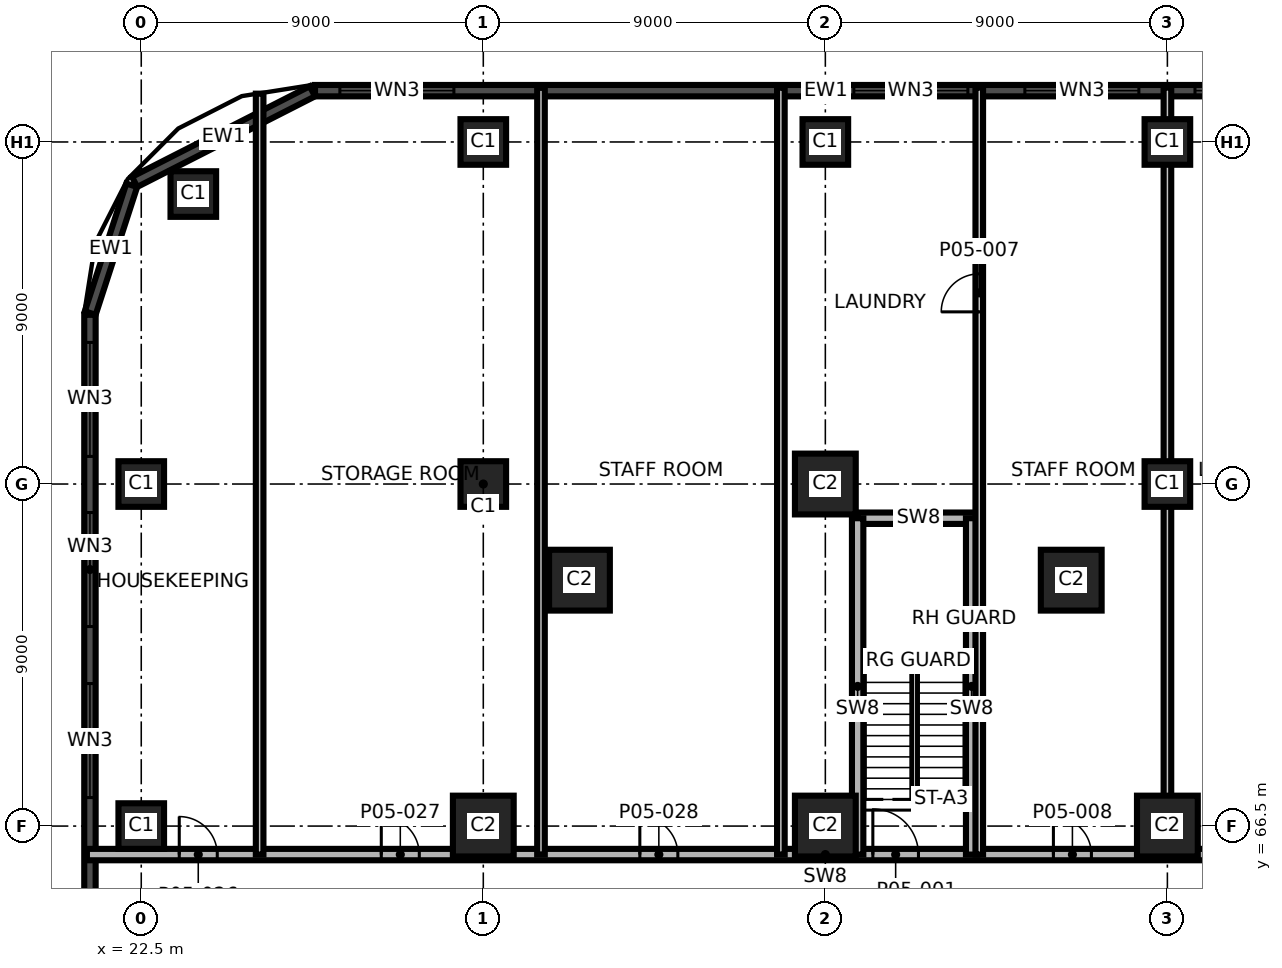
"""IFC4 building model, lengths in metres.
Left out: names, types, materials, properties, quantities, classifications, styles, units other than length and angle.
Written with IfcOpenShell. Run it as: python <this file> out.ifc"""

import sys

from ifc_helpers import new_model, si_unit, direction, frame, frame_2d, origin, origin_2d, place, context, subcontext, project, spatial, rectangle, extrude, element, fill, save


model = new_model("IFC4")
c1 = context("Model", 3, precision=1e-05, world=origin(), true_north=direction((0.0, 1.0)))
c2 = subcontext(c1, "Body", "Model", "MODEL_VIEW")
j1 = project(units=[si_unit("LENGTHUNIT", "METRE"), si_unit("PLANEANGLEUNIT", "RADIAN")], contexts=[c1])
p1 = place(None, origin())
s1 = spatial("IfcSite", under=j1, at=p1, CompositionType="ELEMENT")
p2 = place(p1, origin())
s2 = spatial("IfcBuilding", under=s1, at=p2, CompositionType="ELEMENT")
p3 = place(p2, frame((0.0, 0.0, 28.5)))
s3 = spatial("IfcBuildingStorey", under=s2, at=p3, CompositionType="ELEMENT", Elevation=28.5)
p4 = place(p3, frame((22.5, 66.5, 0.0), z_axis=(0.0, 0.0, 1.0), x_axis=(1.0, 0.0, 0.0)))
e1 = element("IfcColumn", 1, at=p4, inside=s3, PredefinedType="COLUMN", context=c2, shape_type="SweptSolid", body=[
    extrude(rectangle(XDim=1.2, YDim=1.2, at=origin_2d()), origin(), (0.0, 0.0, 1.0), 5.0),
])
for number, where, z_axis, x_axis in (
    (2, (31.5, 66.5, 0.0), (0.0, 0.0, 1.0), (1.0, 0.0, 0.0)),
    (3, (40.5, 66.5, 0.0), (0.0, 0.0, 1.0), (1.0, 0.0, 0.0)),
    (4, (49.5, 66.5, 0.0), (0.0, 0.0, 1.0), (1.0, 0.0, 0.0)),
):
    element("IfcColumn", number, at=place(p3, frame(where, z_axis=z_axis, x_axis=x_axis)), inside=s3, PredefinedType="COLUMN", context=c2, shape_type="SweptSolid", body=[
        extrude(rectangle(XDim=1.6, YDim=1.6, at=origin_2d()), origin(), (0.0, 0.0, 1.0), 5.0),
    ])
for number, where, z_axis, x_axis in (
    (5, (22.5, 75.5, 0.0), (0.0, 0.0, 1.0), (1.0, 0.0, 0.0)),
    (6, (31.5, 75.5, 0.0), (0.0, 0.0, 1.0), (1.0, 0.0, 0.0)),
):
    element("IfcColumn", number, at=place(p3, frame(where, z_axis=z_axis, x_axis=x_axis)), inside=s3, PredefinedType="COLUMN", context=c2, shape_type="SweptSolid", body=[
        extrude(rectangle(XDim=1.2, YDim=1.2, at=origin_2d()), origin(), (0.0, 0.0, 1.0), 5.0),
    ])
p5 = place(p3, frame((40.5, 75.5, 0.0), z_axis=(0.0, 0.0, 1.0), x_axis=(1.0, 0.0, 0.0)))
e7 = element("IfcColumn", 7, at=p5, inside=s3, PredefinedType="COLUMN", context=c2, shape_type="SweptSolid", body=[
    extrude(rectangle(XDim=1.6, YDim=1.6, at=origin_2d()), origin(), (0.0, 0.0, 1.0), 5.0),
])
for number, where, z_axis, x_axis in (
    (8, (49.5, 75.5, 0.0), (0.0, 0.0, 1.0), (1.0, 0.0, 0.0)),
    (9, (23.87, 83.13, 0.0), (0.0, 0.0, 1.0), (1.0, 0.0, 0.0)),
    (10, (31.5, 84.5, 0.0), (0.0, 0.0, 1.0), (1.0, 0.0, 0.0)),
    (11, (40.5, 84.5, 0.0), (0.0, 0.0, 1.0), (1.0, 0.0, 0.0)),
    (12, (49.5, 84.5, 0.0), (0.0, 0.0, 1.0), (1.0, 0.0, 0.0)),
):
    element("IfcColumn", number, at=place(p3, frame(where, z_axis=z_axis, x_axis=x_axis)), inside=s3, PredefinedType="COLUMN", context=c2, shape_type="SweptSolid", body=[
        extrude(rectangle(XDim=1.2, YDim=1.2, at=origin_2d()), origin(), (0.0, 0.0, 1.0), 5.0),
    ])
for number, where, z_axis, x_axis in (
    (13, (34.03, 72.97, 0.0), (0.0, 0.0, 1.0), (1.0, 0.0, 0.0)),
    (14, (46.97, 72.97, 0.0), (0.0, 0.0, 1.0), (1.0, 0.0, 0.0)),
):
    element("IfcColumn", number, at=place(p3, frame(where, z_axis=z_axis, x_axis=x_axis)), inside=s3, PredefinedType="COLUMN", context=c2, shape_type="SweptSolid", body=[
        extrude(rectangle(XDim=1.6, YDim=1.6, at=origin_2d()), origin(), (0.0, 0.0, 1.0), 5.0),
    ])
p6 = place(p3, frame((53.952, 85.85, 0.0), z_axis=(0.0, 0.0, 1.0), x_axis=(-1.0, 0.0, 0.0)))
e15 = element("IfcWall", 15, at=p6, inside=s3, PredefinedType="SOLIDWALL", context=c2, shape_type="SweptSolid", body=[
    extrude(rectangle(XDim=26.88, YDim=0.3, at=frame_2d((13.44, 0.0))), origin(), (0.0, 0.0, 1.0), 4.7),
])
p7 = place(p6, frame((0.726, 0.0, 0.9)))
e16 = element("IfcOpeningElement", 16, at=p7, cuts=e15, PredefinedType="OPENING", context=c2, shape_type="SweptSolid", body=[
    extrude(rectangle(XDim=3.0, YDim=2.4, at=frame_2d((1.5, 1.2))), frame((0.0, 0.16, 0.0), z_axis=(0.0, -1.0, 0.0), x_axis=(1.0, 0.0, 0.0)), (0.0, 0.0, 1.0), 0.32),
])
p8 = place(p6, frame((5.202, 0.0, 0.9)))
e17 = element("IfcOpeningElement", 17, at=p8, cuts=e15, PredefinedType="OPENING", context=c2, shape_type="SweptSolid", body=[
    extrude(rectangle(XDim=3.0, YDim=2.4, at=frame_2d((1.5, 1.2))), frame((0.0, 0.16, 0.0), z_axis=(0.0, -1.0, 0.0), x_axis=(1.0, 0.0, 0.0)), (0.0, 0.0, 1.0), 0.32),
])
p9 = place(p6, frame((9.702, 0.0, 0.9)))
e18 = element("IfcOpeningElement", 18, at=p9, cuts=e15, PredefinedType="OPENING", context=c2, shape_type="SweptSolid", body=[
    extrude(rectangle(XDim=3.0, YDim=2.4, at=frame_2d((1.5, 1.2))), frame((0.0, 0.16, 0.0), z_axis=(0.0, -1.0, 0.0), x_axis=(1.0, 0.0, 0.0)), (0.0, 0.0, 1.0), 0.32),
])
p10 = place(p6, frame((23.226, 0.0, 0.9)))
e19 = element("IfcOpeningElement", 19, at=p10, cuts=e15, PredefinedType="OPENING", context=c2, shape_type="SweptSolid", body=[
    extrude(rectangle(XDim=3.0, YDim=2.4, at=frame_2d((1.5, 1.2))), frame((0.0, 0.16, 0.0), z_axis=(0.0, -1.0, 0.0), x_axis=(1.0, 0.0, 0.0)), (0.0, 0.0, 1.0), 0.32),
])
p11 = place(p3, frame((27.004, 85.834, 0.0), z_axis=(0.0, 0.0, 1.0), x_axis=(-0.890998339455, -0.454006562826, 0.0)))
e20 = element("IfcWall", 20, at=p11, inside=s3, PredefinedType="SOLIDWALL", context=c2, shape_type="SweptSolid", body=[
    extrude(rectangle(XDim=5.252, YDim=0.3, at=frame_2d((2.626, 0.0))), origin(), (0.0, 0.0, 1.0), 4.7),
])
p12 = place(p3, frame((22.25, 83.362, 0.0), z_axis=(0.0, 0.0, 1.0), x_axis=(-0.309073584194, -0.951038127287, 0.0)))
e21 = element("IfcWall", 21, at=p12, inside=s3, PredefinedType="SOLIDWALL", context=c2, shape_type="SweptSolid", body=[
    extrude(rectangle(XDim=3.536, YDim=0.3, at=frame_2d((1.768, 0.0))), origin(), (0.0, 0.0, 1.0), 4.7),
])
p13 = place(p3, frame((21.15, 79.952, 0.0), z_axis=(0.0, 0.0, 1.0), x_axis=(0.0, -1.0, 0.0)))
e22 = element("IfcWall", 22, at=p13, inside=s3, PredefinedType="SOLIDWALL", context=c2, shape_type="SweptSolid", body=[
    extrude(rectangle(XDim=62.88, YDim=0.3, at=frame_2d((31.44, 0.0))), origin(), (0.0, 0.0, 1.0), 4.7),
])
p14 = place(p13, frame((0.726, 0.0, 0.9)))
e23 = element("IfcOpeningElement", 23, at=p14, cuts=e22, PredefinedType="OPENING", context=c2, shape_type="SweptSolid", body=[
    extrude(rectangle(XDim=3.0, YDim=2.4, at=frame_2d((1.5, 1.2))), frame((0.0, 0.16, 0.0), z_axis=(0.0, -1.0, 0.0), x_axis=(1.0, 0.0, 0.0)), (0.0, 0.0, 1.0), 0.32),
])
p15 = place(p13, frame((5.202, 0.0, 0.9)))
e24 = element("IfcOpeningElement", 24, at=p15, cuts=e22, PredefinedType="OPENING", context=c2, shape_type="SweptSolid", body=[
    extrude(rectangle(XDim=3.0, YDim=2.4, at=frame_2d((1.5, 1.2))), frame((0.0, 0.16, 0.0), z_axis=(0.0, -1.0, 0.0), x_axis=(1.0, 0.0, 0.0)), (0.0, 0.0, 1.0), 0.32),
])
p16 = place(p13, frame((9.702, 0.0, 0.9)))
e25 = element("IfcOpeningElement", 25, at=p16, cuts=e22, PredefinedType="OPENING", context=c2, shape_type="SweptSolid", body=[
    extrude(rectangle(XDim=3.0, YDim=2.4, at=frame_2d((1.5, 1.2))), frame((0.0, 0.16, 0.0), z_axis=(0.0, -1.0, 0.0), x_axis=(1.0, 0.0, 0.0)), (0.0, 0.0, 1.0), 0.32),
])
p17 = place(p13, frame((18.702, 0.0, 0.9)))
e26 = element("IfcOpeningElement", 26, at=p17, cuts=e22, PredefinedType="OPENING", context=c2, shape_type="SweptSolid", body=[
    extrude(rectangle(XDim=3.0, YDim=2.4, at=frame_2d((1.5, 1.2))), frame((0.0, 0.16, 0.0), z_axis=(0.0, -1.0, 0.0), x_axis=(1.0, 0.0, 0.0)), (0.0, 0.0, 1.0), 0.32),
])
p18 = place(p13, frame((23.202, 0.0, 0.9)))
e27 = element("IfcOpeningElement", 27, at=p18, cuts=e22, PredefinedType="OPENING", context=c2, shape_type="SweptSolid", body=[
    extrude(rectangle(XDim=3.0, YDim=2.4, at=frame_2d((1.5, 1.2))), frame((0.0, 0.16, 0.0), z_axis=(0.0, -1.0, 0.0), x_axis=(1.0, 0.0, 0.0)), (0.0, 0.0, 1.0), 0.32),
])
p19 = place(p13, frame((27.702, 0.0, 0.9)))
e28 = element("IfcOpeningElement", 28, at=p19, cuts=e22, PredefinedType="OPENING", context=c2, shape_type="SweptSolid", body=[
    extrude(rectangle(XDim=3.0, YDim=2.4, at=frame_2d((1.5, 1.2))), frame((0.0, 0.16, 0.0), z_axis=(0.0, -1.0, 0.0), x_axis=(1.0, 0.0, 0.0)), (0.0, 0.0, 1.0), 0.32),
])
p20 = place(p13, frame((32.202, 0.0, 0.9)))
e29 = element("IfcOpeningElement", 29, at=p20, cuts=e22, PredefinedType="OPENING", context=c2, shape_type="SweptSolid", body=[
    extrude(rectangle(XDim=3.0, YDim=2.4, at=frame_2d((1.5, 1.2))), frame((0.0, 0.16, 0.0), z_axis=(0.0, -1.0, 0.0), x_axis=(1.0, 0.0, 0.0)), (0.0, 0.0, 1.0), 0.32),
])
p21 = place(p13, frame((41.202, 0.0, 0.9)))
e30 = element("IfcOpeningElement", 30, at=p21, cuts=e22, PredefinedType="OPENING", context=c2, shape_type="SweptSolid", body=[
    extrude(rectangle(XDim=3.0, YDim=2.4, at=frame_2d((1.5, 1.2))), frame((0.0, 0.16, 0.0), z_axis=(0.0, -1.0, 0.0), x_axis=(1.0, 0.0, 0.0)), (0.0, 0.0, 1.0), 0.32),
])
p22 = place(p13, frame((45.702, 0.0, 0.9)))
e31 = element("IfcOpeningElement", 31, at=p22, cuts=e22, PredefinedType="OPENING", context=c2, shape_type="SweptSolid", body=[
    extrude(rectangle(XDim=3.0, YDim=2.4, at=frame_2d((1.5, 1.2))), frame((0.0, 0.16, 0.0), z_axis=(0.0, -1.0, 0.0), x_axis=(1.0, 0.0, 0.0)), (0.0, 0.0, 1.0), 0.32),
])
p23 = place(p13, frame((50.202, 0.0, 0.9)))
e32 = element("IfcOpeningElement", 32, at=p23, cuts=e22, PredefinedType="OPENING", context=c2, shape_type="SweptSolid", body=[
    extrude(rectangle(XDim=3.0, YDim=2.4, at=frame_2d((1.5, 1.2))), frame((0.0, 0.16, 0.0), z_axis=(0.0, -1.0, 0.0), x_axis=(1.0, 0.0, 0.0)), (0.0, 0.0, 1.0), 0.32),
])
p24 = place(p13, frame((54.702, 0.0, 0.9)))
e33 = element("IfcOpeningElement", 33, at=p24, cuts=e22, PredefinedType="OPENING", context=c2, shape_type="SweptSolid", body=[
    extrude(rectangle(XDim=3.0, YDim=2.4, at=frame_2d((1.5, 1.2))), frame((0.0, 0.16, 0.0), z_axis=(0.0, -1.0, 0.0), x_axis=(1.0, 0.0, 0.0)), (0.0, 0.0, 1.0), 0.32),
])
p25 = place(p13, frame((59.226, 0.0, 0.9)))
e34 = element("IfcOpeningElement", 34, at=p25, cuts=e22, PredefinedType="OPENING", context=c2, shape_type="SweptSolid", body=[
    extrude(rectangle(XDim=3.0, YDim=2.4, at=frame_2d((1.5, 1.2))), frame((0.0, 0.16, 0.0), z_axis=(0.0, -1.0, 0.0), x_axis=(1.0, 0.0, 0.0)), (0.0, 0.0, 1.0), 0.32),
])
p26 = place(p3, frame((21.07, 65.75, 0.0), z_axis=(0.0, 0.0, 1.0), x_axis=(1.0, 0.0, 0.0)))
e35 = element("IfcWall", 35, at=p26, inside=s3, PredefinedType="SHEAR", context=c2, shape_type="SweptSolid", body=[
    extrude(rectangle(XDim=38.86, YDim=0.3, at=frame_2d((19.43, 0.0))), origin(), (0.0, 0.0, 1.0), 4.7),
])
p27 = place(p26, frame((20.68, 0.0, 0.0)))
e36 = element("IfcOpeningElement", 36, at=p27, cuts=e35, PredefinedType="OPENING", context=c2, shape_type="SweptSolid", body=[
    extrude(rectangle(XDim=1.2, YDim=2.1, at=frame_2d((0.6, 1.05))), frame((0.0, 0.16, 0.0), z_axis=(0.0, -1.0, 0.0), x_axis=(1.0, 0.0, 0.0)), (0.0, 0.0, 1.0), 0.32),
])
p28 = place(p26, frame((25.431, 0.0, 0.0)))
e37 = element("IfcOpeningElement", 37, at=p28, cuts=e35, PredefinedType="OPENING", context=c2, shape_type="SweptSolid", body=[
    extrude(rectangle(XDim=1.0, YDim=2.1, at=frame_2d((0.5, 1.05))), frame((0.0, 0.16, 0.0), z_axis=(0.0, -1.0, 0.0), x_axis=(1.0, 0.0, 0.0)), (0.0, 0.0, 1.0), 0.32),
])
p29 = place(p26, frame((2.43, 0.0, 0.0)))
e38 = element("IfcOpeningElement", 38, at=p29, cuts=e35, PredefinedType="OPENING", context=c2, shape_type="SweptSolid", body=[
    extrude(rectangle(XDim=1.0, YDim=2.1, at=frame_2d((0.5, 1.05))), frame((0.0, 0.16, 0.0), z_axis=(0.0, -1.0, 0.0), x_axis=(1.0, 0.0, 0.0)), (0.0, 0.0, 1.0), 0.32),
])
p30 = place(p26, frame((7.746, 0.0, 0.0)))
e39 = element("IfcOpeningElement", 39, at=p30, cuts=e35, PredefinedType="OPENING", context=c2, shape_type="SweptSolid", body=[
    extrude(rectangle(XDim=1.0, YDim=2.1, at=frame_2d((0.5, 1.05))), frame((0.0, 0.16, 0.0), z_axis=(0.0, -1.0, 0.0), x_axis=(1.0, 0.0, 0.0)), (0.0, 0.0, 1.0), 0.32),
])
p31 = place(p26, frame((14.549, 0.0, 0.0)))
e40 = element("IfcOpeningElement", 40, at=p31, cuts=e35, PredefinedType="OPENING", context=c2, shape_type="SweptSolid", body=[
    extrude(rectangle(XDim=1.0, YDim=2.1, at=frame_2d((0.5, 1.05))), frame((0.0, 0.16, 0.0), z_axis=(0.0, -1.0, 0.0), x_axis=(1.0, 0.0, 0.0)), (0.0, 0.0, 1.0), 0.32),
])
p32 = place(p26, frame((29.965, 0.0, 0.0)))
e41 = element("IfcOpeningElement", 41, at=p32, cuts=e35, PredefinedType="OPENING", context=c2, shape_type="SweptSolid", body=[
    extrude(rectangle(XDim=1.0, YDim=2.1, at=frame_2d((0.5, 1.05))), frame((0.0, 0.16, 0.0), z_axis=(0.0, -1.0, 0.0), x_axis=(1.0, 0.0, 0.0)), (0.0, 0.0, 1.0), 0.32),
])
p33 = place(p26, frame((35.175, 0.0, 0.0)))
e42 = element("IfcOpeningElement", 42, at=p33, cuts=e35, PredefinedType="OPENING", context=c2, shape_type="SweptSolid", body=[
    extrude(rectangle(XDim=1.0, YDim=2.1, at=frame_2d((0.5, 1.05))), frame((0.0, 0.16, 0.0), z_axis=(0.0, -1.0, 0.0), x_axis=(1.0, 0.0, 0.0)), (0.0, 0.0, 1.0), 0.32),
])
p34 = place(p3, frame((41.35, 74.6, 0.0), z_axis=(0.0, 0.0, 1.0), x_axis=(1.0, 0.0, 0.0)))
e43 = element("IfcWall", 43, at=p34, inside=s3, PredefinedType="SHEAR", context=c2, shape_type="SweptSolid", body=[
    extrude(rectangle(XDim=3.2, YDim=0.3, at=frame_2d((1.6, 0.0))), origin(), (0.0, 0.0, 1.0), 4.7),
])
p35 = place(p3, frame((25.615, 65.75, 0.0), z_axis=(0.0, 0.0, 1.0), x_axis=(0.0, 1.0, 0.0)))
e44 = element("IfcWall", 44, at=p35, inside=s3, PredefinedType="PARTITIONING", context=c2, shape_type="SweptSolid", body=[
    extrude(rectangle(XDim=20.021, YDim=0.2, at=frame_2d((10.01, 0.0))), origin(), (0.0, 0.0, 1.0), 4.7),
])
for number, where, z_axis, x_axis in (
    (45, (33.018, 65.75, 0.0), (0.0, 0.0, 1.0), (0.0, 1.0, 0.0)),
    (46, (39.33, 65.75, 0.0), (0.0, 0.0, 1.0), (0.0, 1.0, 0.0)),
):
    element("IfcWall", number, at=place(p3, frame(where, z_axis=z_axis, x_axis=x_axis)), inside=s3, PredefinedType="PARTITIONING", context=c2, shape_type="SweptSolid", body=[
        extrude(rectangle(XDim=20.18, YDim=0.2, at=frame_2d((10.09, 0.0))), origin(), (0.0, 0.0, 1.0), 4.7),
    ])
for number, where, z_axis, x_axis in (
    (47, (41.35, 65.75, 0.0), (0.0, 0.0, 1.0), (0.0, 1.0, 0.0)),
    (48, (44.35, 65.75, 0.0), (0.0, 0.0, 1.0), (0.0, 1.0, 0.0)),
):
    element("IfcWall", number, at=place(p3, frame(where, z_axis=z_axis, x_axis=x_axis)), inside=s3, PredefinedType="SHEAR", context=c2, shape_type="SweptSolid", body=[
        extrude(rectangle(XDim=8.85, YDim=0.3, at=frame_2d((4.425, 0.0))), origin(), (0.0, 0.0, 1.0), 4.7),
    ])
p36 = place(p3, frame((44.55, 65.75, 0.0), z_axis=(0.0, 0.0, 1.0), x_axis=(0.0, 1.0, 0.0)))
e49 = element("IfcWall", 49, at=p36, inside=s3, PredefinedType="PARTITIONING", context=c2, shape_type="SweptSolid", body=[
    extrude(rectangle(XDim=20.18, YDim=0.2, at=frame_2d((10.09, 0.0))), origin(), (0.0, 0.0, 1.0), 4.7),
])
p37 = place(p36, frame((14.28, 0.0, 0.0)))
e50 = element("IfcOpeningElement", 50, at=p37, cuts=e49, PredefinedType="OPENING", context=c2, shape_type="SweptSolid", body=[
    extrude(rectangle(XDim=1.0, YDim=2.1, at=frame_2d((0.5, 1.05))), frame((0.0, 0.11, 0.0), z_axis=(0.0, -1.0, 0.0), x_axis=(1.0, 0.0, 0.0)), (0.0, 0.0, 1.0), 0.22),
])
p38 = place(p3, frame((49.501, 65.75, 0.0), z_axis=(0.0, 0.0, 1.0), x_axis=(0.0, 1.0, 0.0)))
e51 = element("IfcWall", 51, at=p38, inside=s3, PredefinedType="PARTITIONING", context=c2, shape_type="SweptSolid", body=[
    extrude(rectangle(XDim=20.18, YDim=0.2, at=frame_2d((10.09, 0.0))), origin(), (0.0, 0.0, 1.0), 4.7),
])
p39 = place(p7, origin())
e52 = element("IfcWindow", 52, at=p39, inside=s3, PartitioningType="SINGLE_PANEL", PredefinedType="WINDOW", context=c2, shape_type="SweptSolid", body=[
    extrude(rectangle(XDim=3.0, YDim=2.4, at=frame_2d((1.5, 1.2))), frame((0.0, 0.03, 0.0), z_axis=(0.0, -1.0, 0.0), x_axis=(1.0, 0.0, 0.0)), (0.0, 0.0, 1.0), 0.06),
])
fill(e16, e52)
p40 = place(p8, origin())
e53 = element("IfcWindow", 53, at=p40, inside=s3, PartitioningType="SINGLE_PANEL", PredefinedType="WINDOW", context=c2, shape_type="SweptSolid", body=[
    extrude(rectangle(XDim=3.0, YDim=2.4, at=frame_2d((1.5, 1.2))), frame((0.0, 0.03, 0.0), z_axis=(0.0, -1.0, 0.0), x_axis=(1.0, 0.0, 0.0)), (0.0, 0.0, 1.0), 0.06),
])
fill(e17, e53)
p41 = place(p9, origin())
e54 = element("IfcWindow", 54, at=p41, inside=s3, PartitioningType="SINGLE_PANEL", PredefinedType="WINDOW", context=c2, shape_type="SweptSolid", body=[
    extrude(rectangle(XDim=3.0, YDim=2.4, at=frame_2d((1.5, 1.2))), frame((0.0, 0.03, 0.0), z_axis=(0.0, -1.0, 0.0), x_axis=(1.0, 0.0, 0.0)), (0.0, 0.0, 1.0), 0.06),
])
fill(e18, e54)
p42 = place(p10, origin())
e55 = element("IfcWindow", 55, at=p42, inside=s3, PartitioningType="SINGLE_PANEL", PredefinedType="WINDOW", context=c2, shape_type="SweptSolid", body=[
    extrude(rectangle(XDim=3.0, YDim=2.4, at=frame_2d((1.5, 1.2))), frame((0.0, 0.03, 0.0), z_axis=(0.0, -1.0, 0.0), x_axis=(1.0, 0.0, 0.0)), (0.0, 0.0, 1.0), 0.06),
])
fill(e19, e55)
p43 = place(p14, origin())
e56 = element("IfcWindow", 56, at=p43, inside=s3, PartitioningType="SINGLE_PANEL", PredefinedType="WINDOW", context=c2, shape_type="SweptSolid", body=[
    extrude(rectangle(XDim=3.0, YDim=2.4, at=frame_2d((1.5, 1.2))), frame((0.0, 0.03, 0.0), z_axis=(0.0, -1.0, 0.0), x_axis=(1.0, 0.0, 0.0)), (0.0, 0.0, 1.0), 0.06),
])
fill(e23, e56)
p44 = place(p15, origin())
e57 = element("IfcWindow", 57, at=p44, inside=s3, PartitioningType="SINGLE_PANEL", PredefinedType="WINDOW", context=c2, shape_type="SweptSolid", body=[
    extrude(rectangle(XDim=3.0, YDim=2.4, at=frame_2d((1.5, 1.2))), frame((0.0, 0.03, 0.0), z_axis=(0.0, -1.0, 0.0), x_axis=(1.0, 0.0, 0.0)), (0.0, 0.0, 1.0), 0.06),
])
fill(e24, e57)
p45 = place(p16, origin())
e58 = element("IfcWindow", 58, at=p45, inside=s3, PartitioningType="SINGLE_PANEL", PredefinedType="WINDOW", context=c2, shape_type="SweptSolid", body=[
    extrude(rectangle(XDim=3.0, YDim=2.4, at=frame_2d((1.5, 1.2))), frame((0.0, 0.03, 0.0), z_axis=(0.0, -1.0, 0.0), x_axis=(1.0, 0.0, 0.0)), (0.0, 0.0, 1.0), 0.06),
])
fill(e25, e58)
p46 = place(p27, origin())
e59 = element("IfcDoor", 59, at=p46, inside=s3, OperationType="SINGLE_SWING_LEFT", PredefinedType="DOOR", context=c2, shape_type="SweptSolid", body=[
    extrude(rectangle(XDim=1.2, YDim=2.1, at=frame_2d((0.6, 1.05))), frame((0.0, 0.025, 0.0), z_axis=(0.0, -1.0, 0.0), x_axis=(1.0, 0.0, 0.0)), (0.0, 0.0, 1.0), 0.05),
])
fill(e36, e59)
p47 = place(p37, origin())
e60 = element("IfcDoor", 60, at=p47, inside=s3, OperationType="SINGLE_SWING_LEFT", PredefinedType="DOOR", context=c2, shape_type="SweptSolid", body=[
    extrude(rectangle(XDim=1.0, YDim=2.1, at=frame_2d((0.5, 1.05))), frame((0.0, 0.025, 0.0), z_axis=(0.0, -1.0, 0.0), x_axis=(1.0, 0.0, 0.0)), (0.0, 0.0, 1.0), 0.05),
])
fill(e50, e60)
p48 = place(p28, origin())
e61 = element("IfcDoor", 61, at=p48, inside=s3, OperationType="SINGLE_SWING_RIGHT", PredefinedType="DOOR", context=c2, shape_type="SweptSolid", body=[
    extrude(rectangle(XDim=1.0, YDim=2.1, at=frame_2d((0.5, 1.05))), frame((0.0, 0.025, 0.0), z_axis=(0.0, -1.0, 0.0), x_axis=(1.0, 0.0, 0.0)), (0.0, 0.0, 1.0), 0.05),
])
fill(e37, e61)
p49 = place(p29, origin())
e62 = element("IfcDoor", 62, at=p49, inside=s3, OperationType="SINGLE_SWING_RIGHT", PredefinedType="DOOR", context=c2, shape_type="SweptSolid", body=[
    extrude(rectangle(XDim=1.0, YDim=2.1, at=frame_2d((0.5, 1.05))), frame((0.0, 0.025, 0.0), z_axis=(0.0, -1.0, 0.0), x_axis=(1.0, 0.0, 0.0)), (0.0, 0.0, 1.0), 0.05),
])
fill(e38, e62)
p50 = place(p30, origin())
e63 = element("IfcDoor", 63, at=p50, inside=s3, OperationType="SINGLE_SWING_LEFT", PredefinedType="DOOR", context=c2, shape_type="SweptSolid", body=[
    extrude(rectangle(XDim=1.0, YDim=2.1, at=frame_2d((0.5, 1.05))), frame((0.0, 0.025, 0.0), z_axis=(0.0, -1.0, 0.0), x_axis=(1.0, 0.0, 0.0)), (0.0, 0.0, 1.0), 0.05),
])
fill(e39, e63)
p51 = place(p31, origin())
e64 = element("IfcDoor", 64, at=p51, inside=s3, OperationType="SINGLE_SWING_RIGHT", PredefinedType="DOOR", context=c2, shape_type="SweptSolid", body=[
    extrude(rectangle(XDim=1.0, YDim=2.1, at=frame_2d((0.5, 1.05))), frame((0.0, 0.025, 0.0), z_axis=(0.0, -1.0, 0.0), x_axis=(1.0, 0.0, 0.0)), (0.0, 0.0, 1.0), 0.05),
])
fill(e40, e64)
save(model, sys.argv[1])
